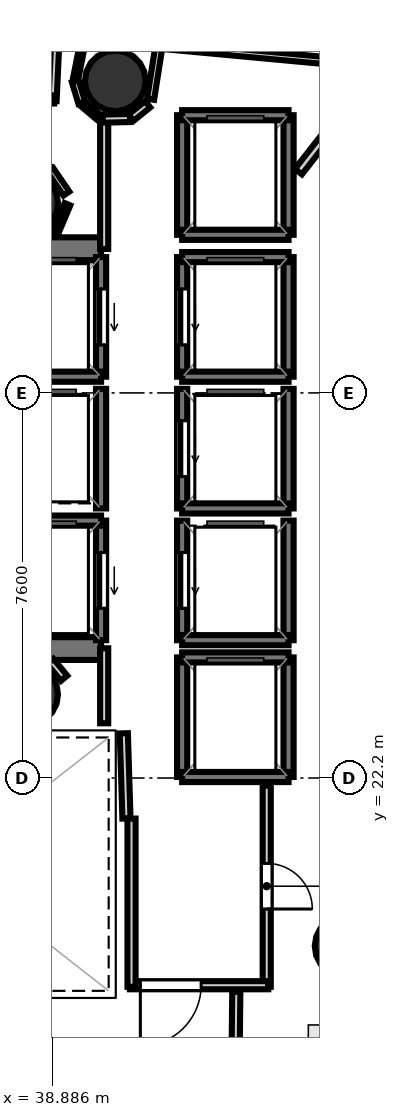
"""IFC4 building model, lengths in metres.
Left out: names, types, materials, properties, quantities, classifications, styles, units other than length and angle.
Written with IfcOpenShell. Run it as: python <this file> out.ifc"""

import sys

from ifc_helpers import new_model, si_unit, direction, frame, frame_2d, origin, origin_2d, place, context, subcontext, project, spatial, rectangle, hollow_circle, extrude, element, fill, save


model = new_model("IFC4")
c1 = context("Model", 3, precision=1e-05, world=origin(), true_north=direction((0.0, 1.0)))
c2 = subcontext(c1, "Body", "Model", "MODEL_VIEW")
j1 = project(units=[si_unit("LENGTHUNIT", "METRE"), si_unit("PLANEANGLEUNIT", "RADIAN")], contexts=[c1])
p1 = place(None, origin())
s1 = spatial("IfcSite", under=j1, at=p1, CompositionType="ELEMENT")
p2 = place(p1, origin())
s2 = spatial("IfcBuilding", under=s1, at=p2, CompositionType="ELEMENT")
p3 = place(p2, frame((0.0, 0.0, 226.2)))
s3 = spatial("IfcBuildingStorey", under=s2, at=p3, CompositionType="ELEMENT", Elevation=226.2)
p4 = place(p3, frame((29.33, 32.645, 0.0), z_axis=(0.0, 0.0, 1.0), x_axis=(1.0, 0.0, 0.0)))
e1 = element("IfcWall", 1, at=p4, inside=s3, PredefinedType="SHEAR", context=c2, shape_type="SweptSolid", body=[
    extrude(rectangle(XDim=10.52, YDim=0.45, at=frame_2d((5.26, 0.0))), origin(), (0.0, 0.0, 1.0), 3.4),
])
p5 = place(p4, frame((0.895, 0.0, 0.0)))
e2 = element("IfcOpeningElement", 2, at=p5, cuts=e1, PredefinedType="OPENING", context=c2, shape_type="SweptSolid", body=[
    extrude(rectangle(XDim=1.25, YDim=2.15, at=frame_2d((0.625, 1.075))), frame((0.0, 0.235, 0.0), z_axis=(0.0, -1.0, 0.0), x_axis=(1.0, 0.0, 0.0)), (0.0, 0.0, 1.0), 0.47),
])
p6 = place(p3, frame((29.33, 24.755, 0.0), z_axis=(0.0, 0.0, 1.0), x_axis=(1.0, 0.0, 0.0)))
e3 = element("IfcWall", 3, at=p6, inside=s3, PredefinedType="SHEAR", context=c2, shape_type="SweptSolid", body=[
    extrude(rectangle(XDim=10.52, YDim=0.45, at=frame_2d((5.26, 0.0))), origin(), (0.0, 0.0, 1.0), 3.4),
])
p7 = place(p6, frame((0.695, 0.0, 0.0)))
e4 = element("IfcOpeningElement", 4, at=p7, cuts=e3, PredefinedType="OPENING", context=c2, shape_type="SweptSolid", body=[
    extrude(rectangle(XDim=1.25, YDim=2.15, at=frame_2d((0.625, 1.075))), frame((0.0, 0.235, 0.0), z_axis=(0.0, -1.0, 0.0), x_axis=(1.0, 0.0, 0.0)), (0.0, 0.0, 1.0), 0.47),
])
for number, where, z_axis, x_axis in (
    (5, (38.4, 33.55, 0.0), (0.0, 0.0, 1.0), (1.0, 0.0, 0.0)),
    (6, (38.4, 23.85, 0.0), (0.0, 0.0, 1.0), (1.0, 0.0, 0.0)),
    (7, (40.131, 35.958, 0.0), (0.0, 0.0, 1.0), (1.0, 0.0, 0.0)),
    (8, (44.667, 18.883, 0.0), (0.0, 0.0, 1.0), (1.0, 0.0, 0.0)),
):
    element("IfcColumn", number, at=place(p3, frame(where, z_axis=z_axis, x_axis=x_axis)), inside=s3, PredefinedType="COLUMN", context=c2, shape_type="SweptSolid", body=[
        extrude(hollow_circle(Radius=0.6, WallThickness=0.03, at=origin_2d()), origin(), (0.0, 0.0, 1.0), 3.7),
    ])
p8 = place(p3, frame((39.85, 30.12, 0.0), z_axis=(0.0, 0.0, 1.0), x_axis=(0.0, 1.0, 0.0)))
e9 = element("IfcWall", 9, at=p8, inside=s3, PredefinedType="SOLIDWALL", context=c2, shape_type="SweptSolid", body=[
    extrude(rectangle(XDim=2.36, YDim=0.2, at=frame_2d((1.18, 0.0))), origin(), (0.0, 0.0, 1.0), 3.4),
])
p9 = place(p8, frame((0.63, 0.0, 0.0)))
e10 = element("IfcOpeningElement", 10, at=p9, cuts=e9, PredefinedType="OPENING", context=c2, shape_type="SweptSolid", body=[
    extrude(rectangle(XDim=1.1, YDim=2.15, at=frame_2d((0.55, 1.075))), frame((0.0, 0.11, 0.0), z_axis=(0.0, -1.0, 0.0), x_axis=(1.0, 0.0, 0.0)), (0.0, 0.0, 1.0), 0.22),
])
p10 = place(p3, frame((37.75, 30.12, 0.0), z_axis=(0.0, 0.0, 1.0), x_axis=(1.0, 0.0, 0.0)))
e11 = element("IfcWall", 11, at=p10, inside=s3, PredefinedType="SOLIDWALL", context=c2, shape_type="SweptSolid", body=[
    extrude(rectangle(XDim=2.1, YDim=0.2, at=frame_2d((1.05, 0.0))), origin(), (0.0, 0.0, 1.0), 3.4),
])
p11 = place(p3, frame((39.85, 24.92, 0.0), z_axis=(0.0, 0.0, 1.0), x_axis=(0.0, 1.0, 0.0)))
e12 = element("IfcWall", 12, at=p11, inside=s3, PredefinedType="SOLIDWALL", context=c2, shape_type="SweptSolid", body=[
    extrude(rectangle(XDim=2.36, YDim=0.2, at=frame_2d((1.18, 0.0))), origin(), (0.0, 0.0, 1.0), 3.4),
])
p12 = place(p11, frame((0.63, 0.0, 0.0)))
e13 = element("IfcOpeningElement", 13, at=p12, cuts=e12, PredefinedType="OPENING", context=c2, shape_type="SweptSolid", body=[
    extrude(rectangle(XDim=1.1, YDim=2.15, at=frame_2d((0.55, 1.075))), frame((0.0, 0.11, 0.0), z_axis=(0.0, -1.0, 0.0), x_axis=(1.0, 0.0, 0.0)), (0.0, 0.0, 1.0), 0.22),
])
p13 = place(p3, frame((37.75, 27.28, 0.0), z_axis=(0.0, 0.0, 1.0), x_axis=(1.0, 0.0, 0.0)))
e14 = element("IfcWall", 14, at=p13, inside=s3, PredefinedType="SOLIDWALL", context=c2, shape_type="SweptSolid", body=[
    extrude(rectangle(XDim=2.1, YDim=0.2, at=frame_2d((1.05, 0.0))), origin(), (0.0, 0.0, 1.0), 3.4),
])
p14 = place(p3, frame((43.55, 30.12, 0.0), z_axis=(0.0, 0.0, 1.0), x_axis=(0.0, 1.0, 0.0)))
e15 = element("IfcWall", 15, at=p14, inside=s3, PredefinedType="SOLIDWALL", context=c2, shape_type="SweptSolid", body=[
    extrude(rectangle(XDim=2.36, YDim=0.2, at=frame_2d((1.18, 0.0))), origin(), (0.0, 0.0, 1.0), 3.4),
])
p15 = place(p3, frame((41.45, 30.12, 0.0), z_axis=(0.0, 0.0, 1.0), x_axis=(0.0, 1.0, 0.0)))
e16 = element("IfcWall", 16, at=p15, inside=s3, PredefinedType="SOLIDWALL", context=c2, shape_type="SweptSolid", body=[
    extrude(rectangle(XDim=2.36, YDim=0.2, at=frame_2d((1.18, 0.0))), origin(), (0.0, 0.0, 1.0), 3.4),
])
p16 = place(p15, frame((0.63, 0.0, 0.0)))
e17 = element("IfcOpeningElement", 17, at=p16, cuts=e16, PredefinedType="OPENING", context=c2, shape_type="SweptSolid", body=[
    extrude(rectangle(XDim=1.1, YDim=2.15, at=frame_2d((0.55, 1.075))), frame((0.0, 0.11, 0.0), z_axis=(0.0, -1.0, 0.0), x_axis=(1.0, 0.0, 0.0)), (0.0, 0.0, 1.0), 0.22),
])
for number, where, z_axis, x_axis in (
    (18, (41.45, 32.48, 0.0), (0.0, 0.0, 1.0), (1.0, 0.0, 0.0)),
    (19, (41.45, 30.12, 0.0), (0.0, 0.0, 1.0), (1.0, 0.0, 0.0)),
):
    element("IfcWall", number, at=place(p3, frame(where, z_axis=z_axis, x_axis=x_axis)), inside=s3, PredefinedType="SOLIDWALL", context=c2, shape_type="SweptSolid", body=[
        extrude(rectangle(XDim=2.1, YDim=0.2, at=frame_2d((1.05, 0.0))), origin(), (0.0, 0.0, 1.0), 3.4),
    ])
p17 = place(p3, frame((43.55, 27.52, 0.0), z_axis=(0.0, 0.0, 1.0), x_axis=(0.0, 1.0, 0.0)))
e20 = element("IfcWall", 20, at=p17, inside=s3, PredefinedType="SOLIDWALL", context=c2, shape_type="SweptSolid", body=[
    extrude(rectangle(XDim=2.36, YDim=0.2, at=frame_2d((1.18, 0.0))), origin(), (0.0, 0.0, 1.0), 3.4),
])
p18 = place(p3, frame((41.45, 27.52, 0.0), z_axis=(0.0, 0.0, 1.0), x_axis=(0.0, 1.0, 0.0)))
e21 = element("IfcWall", 21, at=p18, inside=s3, PredefinedType="SOLIDWALL", context=c2, shape_type="SweptSolid", body=[
    extrude(rectangle(XDim=2.36, YDim=0.2, at=frame_2d((1.18, 0.0))), origin(), (0.0, 0.0, 1.0), 3.4),
])
p19 = place(p18, frame((0.63, 0.0, 0.0)))
e22 = element("IfcOpeningElement", 22, at=p19, cuts=e21, PredefinedType="OPENING", context=c2, shape_type="SweptSolid", body=[
    extrude(rectangle(XDim=1.1, YDim=2.15, at=frame_2d((0.55, 1.075))), frame((0.0, 0.11, 0.0), z_axis=(0.0, -1.0, 0.0), x_axis=(1.0, 0.0, 0.0)), (0.0, 0.0, 1.0), 0.22),
])
p20 = place(p3, frame((41.45, 27.52, 0.0), z_axis=(0.0, 0.0, 1.0), x_axis=(1.0, 0.0, 0.0)))
e23 = element("IfcWall", 23, at=p20, inside=s3, PredefinedType="SOLIDWALL", context=c2, shape_type="SweptSolid", body=[
    extrude(rectangle(XDim=2.1, YDim=0.2, at=frame_2d((1.05, 0.0))), origin(), (0.0, 0.0, 1.0), 3.4),
])
p21 = place(p3, frame((43.55, 24.92, 0.0), z_axis=(0.0, 0.0, 1.0), x_axis=(0.0, 1.0, 0.0)))
e24 = element("IfcWall", 24, at=p21, inside=s3, PredefinedType="SOLIDWALL", context=c2, shape_type="SweptSolid", body=[
    extrude(rectangle(XDim=2.36, YDim=0.2, at=frame_2d((1.18, 0.0))), origin(), (0.0, 0.0, 1.0), 3.4),
])
p22 = place(p3, frame((41.45, 24.92, 0.0), z_axis=(0.0, 0.0, 1.0), x_axis=(0.0, 1.0, 0.0)))
e25 = element("IfcWall", 25, at=p22, inside=s3, PredefinedType="SOLIDWALL", context=c2, shape_type="SweptSolid", body=[
    extrude(rectangle(XDim=2.36, YDim=0.2, at=frame_2d((1.18, 0.0))), origin(), (0.0, 0.0, 1.0), 3.4),
])
p23 = place(p22, frame((0.63, 0.0, 0.0)))
e26 = element("IfcOpeningElement", 26, at=p23, cuts=e25, PredefinedType="OPENING", context=c2, shape_type="SweptSolid", body=[
    extrude(rectangle(XDim=1.1, YDim=2.15, at=frame_2d((0.55, 1.075))), frame((0.0, 0.11, 0.0), z_axis=(0.0, -1.0, 0.0), x_axis=(1.0, 0.0, 0.0)), (0.0, 0.0, 1.0), 0.22),
])
p24 = place(p3, frame((41.45, 24.92, 0.0), z_axis=(0.0, 0.0, 1.0), x_axis=(1.0, 0.0, 0.0)))
e27 = element("IfcWall", 27, at=p24, inside=s3, PredefinedType="SOLIDWALL", context=c2, shape_type="SweptSolid", body=[
    extrude(rectangle(XDim=2.1, YDim=0.2, at=frame_2d((1.05, 0.0))), origin(), (0.0, 0.0, 1.0), 3.4),
])
p25 = place(p3, frame((39.85, 27.52, 0.0), z_axis=(0.0, 0.0, 1.0), x_axis=(0.0, 1.0, 0.0)))
e28 = element("IfcWall", 28, at=p25, inside=s3, PredefinedType="SOLIDWALL", context=c2, shape_type="SweptSolid", body=[
    extrude(rectangle(XDim=2.36, YDim=0.2, at=frame_2d((1.18, 0.0))), origin(), (0.0, 0.0, 1.0), 3.4),
])
for number, where, z_axis, x_axis in (
    (29, (43.55, 22.22, 0.0), (0.0, 0.0, 1.0), (0.0, 1.0, 0.0)),
    (30, (41.45, 22.22, 0.0), (0.0, 0.0, 1.0), (0.0, 1.0, 0.0)),
):
    element("IfcWall", number, at=place(p3, frame(where, z_axis=z_axis, x_axis=x_axis)), inside=s3, PredefinedType="SOLIDWALL", context=c2, shape_type="SweptSolid", body=[
        extrude(rectangle(XDim=2.36, YDim=0.2, at=frame_2d((1.18, 0.0))), origin(), (0.0, 0.0, 1.0), 3.4),
    ])
for number, where, z_axis, x_axis in (
    (31, (41.45, 24.58, 0.0), (0.0, 0.0, 1.0), (1.0, 0.0, 0.0)),
    (32, (41.45, 22.22, 0.0), (0.0, 0.0, 1.0), (1.0, 0.0, 0.0)),
):
    element("IfcWall", number, at=place(p3, frame(where, z_axis=z_axis, x_axis=x_axis)), inside=s3, PredefinedType="SOLIDWALL", context=c2, shape_type="SweptSolid", body=[
        extrude(rectangle(XDim=2.1, YDim=0.2, at=frame_2d((1.05, 0.0))), origin(), (0.0, 0.0, 1.0), 3.4),
    ])
for number, where, z_axis, x_axis in (
    (33, (43.55, 32.92, 0.0), (0.0, 0.0, 1.0), (0.0, 1.0, 0.0)),
    (34, (41.45, 32.92, 0.0), (0.0, 0.0, 1.0), (0.0, 1.0, 0.0)),
):
    element("IfcWall", number, at=place(p3, frame(where, z_axis=z_axis, x_axis=x_axis)), inside=s3, PredefinedType="SOLIDWALL", context=c2, shape_type="SweptSolid", body=[
        extrude(rectangle(XDim=2.36, YDim=0.2, at=frame_2d((1.18, 0.0))), origin(), (0.0, 0.0, 1.0), 3.4),
    ])
for number, where, z_axis, x_axis in (
    (35, (41.45, 35.28, 0.0), (0.0, 0.0, 1.0), (1.0, 0.0, 0.0)),
    (36, (41.45, 32.92, 0.0), (0.0, 0.0, 1.0), (1.0, 0.0, 0.0)),
):
    element("IfcWall", number, at=place(p3, frame(where, z_axis=z_axis, x_axis=x_axis)), inside=s3, PredefinedType="SOLIDWALL", context=c2, shape_type="SweptSolid", body=[
        extrude(rectangle(XDim=2.1, YDim=0.2, at=frame_2d((1.05, 0.0))), origin(), (0.0, 0.0, 1.0), 3.4),
    ])
p26 = place(p3, frame((40.351, 21.401, 0.0), z_axis=(0.0, 0.0, 1.0), x_axis=(-0.031058045979, 0.999517582527, 0.0)))
e37 = element("IfcWall", 37, at=p26, inside=s3, PredefinedType="PARTITIONING", context=c2, shape_type="SweptSolid", body=[
    extrude(rectangle(XDim=1.682, YDim=0.16, at=frame_2d((0.841, 0.0))), origin(), (0.0, 0.0, 1.0), 2.72),
])
p27 = place(p3, frame((39.911, 23.28, 0.0), z_axis=(0.0, 0.0, 1.0), x_axis=(0.0, 1.0, 0.0)))
e38 = element("IfcWall", 38, at=p27, inside=s3, PredefinedType="PARTITIONING", context=c2, shape_type="SweptSolid", body=[
    extrude(rectangle(XDim=1.48, YDim=0.16, at=frame_2d((0.74, 0.0))), origin(), (0.0, 0.0, 1.0), 2.72),
])
p28 = place(p3, frame((39.911, 32.64, 0.0), z_axis=(0.0, 0.0, 1.0), x_axis=(0.0, 1.0, 0.0)))
e39 = element("IfcWall", 39, at=p28, inside=s3, PredefinedType="PARTITIONING", context=c2, shape_type="SweptSolid", body=[
    extrude(rectangle(XDim=2.604, YDim=0.16, at=frame_2d((1.302, 0.0))), origin(), (0.0, 0.0, 1.0), 2.72),
])
p29 = place(p3, frame((39.881, 35.213, 0.0), z_axis=(0.0, 0.0, 1.0), x_axis=(0.999756500784, 0.02206669754, 0.0)))
e40 = element("IfcWall", 40, at=p29, inside=s3, PredefinedType="PARTITIONING", context=c2, shape_type="SweptSolid", body=[
    extrude(rectangle(XDim=0.542, YDim=0.16, at=frame_2d((0.271, 0.0))), origin(), (0.0, 0.0, 1.0), 2.72),
])
p30 = place(p3, frame((40.441, 35.232, 0.0), z_axis=(0.0, 0.0, 1.0), x_axis=(0.778714564707, 0.627378376033, 0.0)))
e41 = element("IfcWall", 41, at=p30, inside=s3, PredefinedType="PARTITIONING", context=c2, shape_type="SweptSolid", body=[
    extrude(rectangle(XDim=0.421, YDim=0.16, at=frame_2d((0.21, 0.0))), origin(), (0.0, 0.0, 1.0), 2.72),
])
p31 = place(p3, frame((43.119, 22.05, 0.0), z_axis=(0.0, 0.0, 1.0), x_axis=(0.0, -1.0, 0.0)))
e42 = element("IfcWall", 42, at=p31, inside=s3, PredefinedType="PARTITIONING", context=c2, shape_type="SweptSolid", body=[
    extrude(rectangle(XDim=3.97, YDim=0.16, at=frame_2d((1.985, 0.0))), origin(), (0.0, 0.0, 1.0), 2.72),
])
p32 = place(p31, frame((1.535, 0.0, 0.0)))
e43 = element("IfcOpeningElement", 43, at=p32, cuts=e42, PredefinedType="OPENING", context=c2, shape_type="SweptSolid", body=[
    extrude(rectangle(XDim=0.9, YDim=2.1, at=frame_2d((0.45, 1.05))), frame((0.0, 0.09, 0.0), z_axis=(0.0, -1.0, 0.0), x_axis=(1.0, 0.0, 0.0)), (0.0, 0.0, 1.0), 0.18),
])
p33 = place(p3, frame((43.15, 18.111, 0.0), z_axis=(0.0, 0.0, 1.0), x_axis=(-1.0, 0.0, 0.0)))
e44 = element("IfcWall", 44, at=p33, inside=s3, PredefinedType="PARTITIONING", context=c2, shape_type="SweptSolid", body=[
    extrude(rectangle(XDim=2.73, YDim=0.16, at=frame_2d((1.365, 0.0))), origin(), (0.0, 0.0, 1.0), 2.72),
])
p34 = place(p33, frame((1.325, 0.0, 0.0)))
e45 = element("IfcOpeningElement", 45, at=p34, cuts=e44, PredefinedType="OPENING", context=c2, shape_type="SweptSolid", body=[
    extrude(rectangle(XDim=1.2, YDim=2.15, at=frame_2d((0.6, 1.075))), frame((0.0, 0.09, 0.0), z_axis=(0.0, -1.0, 0.0), x_axis=(1.0, 0.0, 0.0)), (0.0, 0.0, 1.0), 0.18),
])
p35 = place(p3, frame((40.451, 18.08, 0.0), z_axis=(0.0, 0.0, 1.0), x_axis=(0.0, 1.0, 0.0)))
e46 = element("IfcWall", 46, at=p35, inside=s3, PredefinedType="PARTITIONING", context=c2, shape_type="SweptSolid", body=[
    extrude(rectangle(XDim=3.32, YDim=0.16, at=frame_2d((1.66, 0.0))), origin(), (0.0, 0.0, 1.0), 2.72),
])
p36 = place(p3, frame((39.121, 24.17, 0.0), z_axis=(0.0, 0.0, 1.0), x_axis=(-0.638008265708, 0.770029514296, 0.0)))
e47 = element("IfcWall", 47, at=p36, inside=s3, PredefinedType="PARTITIONING", context=c2, shape_type="SweptSolid", body=[
    extrude(rectangle(XDim=0.431, YDim=0.16, at=frame_2d((0.215, 0.0))), origin(), (0.0, 0.0, 1.0), 2.72),
])
p37 = place(p3, frame((38.979, 37.424, 0.0), z_axis=(0.0, 0.0, 1.0), x_axis=(-0.046339891036, -0.998925730222, 0.0)))
e48 = element("IfcWall", 48, at=p37, inside=s3, PredefinedType="PARTITIONING", context=c2, shape_type="SweptSolid", body=[
    extrude(rectangle(XDim=1.865, YDim=0.16, at=frame_2d((0.933, 0.0))), origin(), (0.0, 0.0, 1.0), 2.72),
])
p38 = place(p3, frame((38.924, 35.591, 0.0), z_axis=(0.0, 0.0, 1.0), x_axis=(-0.999997249133, 0.002345576034, 0.0)))
e49 = element("IfcWall", 49, at=p38, inside=s3, PredefinedType="PARTITIONING", context=c2, shape_type="SweptSolid", body=[
    extrude(rectangle(XDim=1.874, YDim=0.16, at=frame_2d((0.937, 0.0))), origin(), (0.0, 0.0, 1.0), 2.72),
])
p39 = place(p3, frame((42.519, 17.98, 0.0), z_axis=(0.0, 0.0, 1.0), x_axis=(-0.011327152438, -0.999935845751, 0.0)))
e50 = element("IfcWall", 50, at=p39, inside=s3, PredefinedType="PARTITIONING", context=c2, shape_type="SweptSolid", body=[
    extrude(rectangle(XDim=3.104, YDim=0.16, at=frame_2d((1.552, 0.0))), origin(), (0.0, 0.0, 1.0), 2.72),
])
p40 = place(p3, frame((43.744, 34.166, 0.0), z_axis=(0.0, 0.0, 1.0), x_axis=(0.615631223484, 0.788034388001, 0.0)))
e51 = element("IfcWall", 51, at=p40, inside=s3, PredefinedType="PLUMBINGWALL", context=c2, shape_type="SweptSolid", body=[
    extrude(rectangle(XDim=3.326, YDim=0.175, at=frame_2d((1.663, 0.0))), origin(), (0.0, 0.0, 1.0), 2.72),
])
p41 = place(p3, frame((40.827, 35.594, 0.0), z_axis=(0.0, 0.0, 1.0), x_axis=(0.155492863566, 0.987837015595, 0.0)))
e52 = element("IfcWall", 52, at=p41, inside=s3, PredefinedType="PARTITIONING", context=c2, shape_type="SweptSolid", body=[
    extrude(rectangle(XDim=1.655, YDim=0.14, at=frame_2d((0.827, 0.0))), origin(), (0.0, 0.0, 1.0), 2.72),
])
p42 = place(p3, frame((39.619, 37.365, 0.0), z_axis=(0.0, 0.0, 1.0), x_axis=(-0.194899506201, -0.980823216733, 0.0)))
e53 = element("IfcWall", 53, at=p42, inside=s3, PredefinedType="PARTITIONING", context=c2, shape_type="SweptSolid", body=[
    extrude(rectangle(XDim=1.428, YDim=0.105, at=frame_2d((0.714, 0.0))), origin(), (0.0, 0.0, 1.0), 2.72),
])
p43 = place(p3, frame((39.341, 35.949, 0.0), z_axis=(0.0, 0.0, 1.0), x_axis=(0.290544943199, -0.956861346268, 0.0)))
e54 = element("IfcWall", 54, at=p43, inside=s3, PredefinedType="PARTITIONING", context=c2, shape_type="SweptSolid", body=[
    extrude(rectangle(XDim=0.441, YDim=0.14, at=frame_2d((0.221, 0.0))), origin(), (0.0, 0.0, 1.0), 2.72),
])
p44 = place(p3, frame((39.479, 35.512, 0.0), z_axis=(0.0, 0.0, 1.0), x_axis=(0.764834909506, -0.644226327622, 0.0)))
e55 = element("IfcWall", 55, at=p44, inside=s3, PredefinedType="PARTITIONING", context=c2, shape_type="SweptSolid", body=[
    extrude(rectangle(XDim=0.415, YDim=0.12, at=frame_2d((0.208, 0.0))), origin(), (0.0, 0.0, 1.0), 2.72),
])
p45 = place(p3, frame((39.166, 33.733, 0.0), z_axis=(0.0, 0.0, 1.0), x_axis=(-0.563162199293, 0.826346378517, 0.0)))
e56 = element("IfcWall", 56, at=p45, inside=s3, PredefinedType="PARTITIONING", context=c2, shape_type="SweptSolid", body=[
    extrude(rectangle(XDim=0.564, YDim=0.14, at=frame_2d((0.282, 0.0))), origin(), (0.0, 0.0, 1.0), 2.72),
])
p46 = place(p3, frame((38.855, 32.945, 0.0), z_axis=(0.0, 0.0, 1.0), x_axis=(0.924628481531, 0.380870281252, 0.0)))
e57 = element("IfcWall", 57, at=p46, inside=s3, PredefinedType="PARTITIONING", context=c2, shape_type="SweptSolid", body=[
    extrude(rectangle(XDim=0.102, YDim=0.14, at=frame_2d((0.051, 0.0))), origin(), (0.0, 0.0, 1.0), 2.72),
])
p47 = place(p3, frame((38.966, 33.0, 0.0), z_axis=(0.0, 0.0, 1.0), x_axis=(0.389247517771, 0.921133198788, 0.0)))
e58 = element("IfcWall", 58, at=p47, inside=s3, PredefinedType="PARTITIONING", context=c2, shape_type="SweptSolid", body=[
    extrude(rectangle(XDim=0.568, YDim=0.12, at=frame_2d((0.284, 0.0))), origin(), (0.0, 0.0, 1.0), 2.72),
])
p48 = place(p3, frame((39.062, 36.843, 0.0), z_axis=(0.0, 0.0, 1.0), x_axis=(0.995704481779, -0.092588255012, 0.0)))
e59 = element("IfcWall", 59, at=p48, inside=s3, PredefinedType="PARTITIONING", context=c2, shape_type="SweptSolid", body=[
    extrude(rectangle(XDim=6.252, YDim=0.14, at=frame_2d((3.126, 0.0))), origin(), (0.0, 0.0, 1.0), 2.72),
])
p49 = place(p9, origin())
e60 = element("IfcDoor", 60, at=p49, inside=s3, OperationType="SLIDING_TO_LEFT", PredefinedType="DOOR", context=c2, shape_type="SweptSolid", body=[
    extrude(rectangle(XDim=1.1, YDim=2.15, at=frame_2d((0.55, 1.075))), frame((0.0, 0.025, 0.0), z_axis=(0.0, -1.0, 0.0), x_axis=(1.0, 0.0, 0.0)), (0.0, 0.0, 1.0), 0.05),
])
fill(e10, e60)
p50 = place(p12, origin())
e61 = element("IfcDoor", 61, at=p50, inside=s3, OperationType="SLIDING_TO_LEFT", PredefinedType="DOOR", context=c2, shape_type="SweptSolid", body=[
    extrude(rectangle(XDim=1.1, YDim=2.15, at=frame_2d((0.55, 1.075))), frame((0.0, 0.025, 0.0), z_axis=(0.0, -1.0, 0.0), x_axis=(1.0, 0.0, 0.0)), (0.0, 0.0, 1.0), 0.05),
])
fill(e13, e61)
p51 = place(p16, origin())
e62 = element("IfcDoor", 62, at=p51, inside=s3, OperationType="SLIDING_TO_LEFT", PredefinedType="DOOR", context=c2, shape_type="SweptSolid", body=[
    extrude(rectangle(XDim=1.1, YDim=2.15, at=frame_2d((0.55, 1.075))), frame((0.0, 0.025, 0.0), z_axis=(0.0, -1.0, 0.0), x_axis=(1.0, 0.0, 0.0)), (0.0, 0.0, 1.0), 0.05),
])
fill(e17, e62)
p52 = place(p19, origin())
e63 = element("IfcDoor", 63, at=p52, inside=s3, OperationType="SLIDING_TO_LEFT", PredefinedType="DOOR", context=c2, shape_type="SweptSolid", body=[
    extrude(rectangle(XDim=1.1, YDim=2.15, at=frame_2d((0.55, 1.075))), frame((0.0, 0.025, 0.0), z_axis=(0.0, -1.0, 0.0), x_axis=(1.0, 0.0, 0.0)), (0.0, 0.0, 1.0), 0.05),
])
fill(e22, e63)
p53 = place(p23, origin())
e64 = element("IfcDoor", 64, at=p53, inside=s3, OperationType="SLIDING_TO_LEFT", PredefinedType="DOOR", context=c2, shape_type="SweptSolid", body=[
    extrude(rectangle(XDim=1.1, YDim=2.15, at=frame_2d((0.55, 1.075))), frame((0.0, 0.025, 0.0), z_axis=(0.0, -1.0, 0.0), x_axis=(1.0, 0.0, 0.0)), (0.0, 0.0, 1.0), 0.05),
])
fill(e26, e64)
p54 = place(p34, origin())
e65 = element("IfcDoor", 65, at=p54, inside=s3, OperationType="SINGLE_SWING_RIGHT", PredefinedType="DOOR", context=c2, shape_type="SweptSolid", body=[
    extrude(rectangle(XDim=1.2, YDim=2.15, at=frame_2d((0.6, 1.075))), frame((0.0, 0.025, 0.0), z_axis=(0.0, -1.0, 0.0), x_axis=(1.0, 0.0, 0.0)), (0.0, 0.0, 1.0), 0.05),
])
fill(e45, e65)
p55 = place(p32, origin())
e66 = element("IfcDoor", 66, at=p55, inside=s3, OperationType="SINGLE_SWING_RIGHT", PredefinedType="DOOR", context=c2, shape_type="SweptSolid", body=[
    extrude(rectangle(XDim=0.9, YDim=2.1, at=frame_2d((0.45, 1.05))), frame((0.0, 0.025, 0.0), z_axis=(0.0, -1.0, 0.0), x_axis=(1.0, 0.0, 0.0)), (0.0, 0.0, 1.0), 0.05),
])
fill(e43, e66)
save(model, sys.argv[1])
